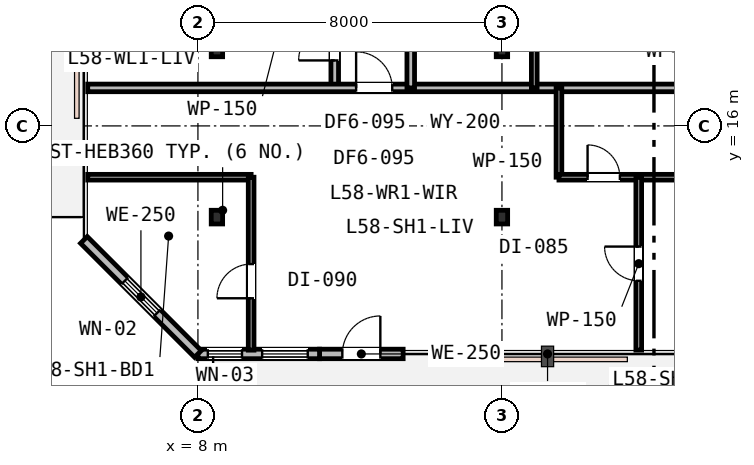
"""IFC4 building model, lengths in metres.
Left out: names, types, materials, properties, quantities, classifications, styles, units other than length and angle.
Written with IfcOpenShell. Run it as: python <this file> out.ifc"""

import sys

from ifc_helpers import new_model, si_unit, direction, frame, frame_2d, origin, origin_2d, place, context, subcontext, project, spatial, rectangle, i_section, extrude, element, fill, save


model = new_model("IFC4")
c1 = context("Model", 3, precision=1e-05, world=origin(), true_north=direction((0.0, 1.0)))
c2 = subcontext(c1, "Body", "Model", "MODEL_VIEW")
j1 = project(units=[si_unit("LENGTHUNIT", "METRE"), si_unit("PLANEANGLEUNIT", "RADIAN")], contexts=[c1])
p1 = place(None, origin())
s1 = spatial("IfcSite", under=j1, at=p1, CompositionType="ELEMENT")
p2 = place(p1, origin())
s2 = spatial("IfcBuilding", under=s1, at=p2, CompositionType="ELEMENT")
p3 = place(p2, frame((0.0, 0.0, 226.0)))
s3 = spatial("IfcBuildingStorey", under=s2, at=p3, CompositionType="ELEMENT", Elevation=226.0)
for number, where, z_axis, x_axis in (
    (1, (8.5, 13.6, 0.0), (0.0, 0.0, 1.0), (1.0, 0.0, 0.0)),
    (2, (16.0, 13.6, 0.0), (0.0, 0.0, 1.0), (1.0, 0.0, 0.0)),
    (3, (8.5, 18.0, 0.0), (0.0, 0.0, 1.0), (1.0, 0.0, 0.0)),
    (4, (16.0, 18.0, 0.0), (0.0, 0.0, 1.0), (1.0, 0.0, 0.0)),
):
    element("IfcColumn", number, at=place(p3, frame(where, z_axis=z_axis, x_axis=x_axis)), inside=s3, PredefinedType="COLUMN", context=c2, shape_type="SweptSolid", body=[
        extrude(i_section(OverallWidth=0.3, OverallDepth=0.36, WebThickness=0.013, FlangeThickness=0.022, FilletRadius=0.027, at=origin_2d()), origin(), (0.0, 0.0, 1.0), 3.8),
    ])
p4 = place(p3, frame((11.2, 10.0, 0.0), z_axis=(0.0, 0.0, 1.0), x_axis=(1.0, 0.0, 0.0)))
e5 = element("IfcWall", 5, at=p4, inside=s3, PredefinedType="STANDARD", context=c2, shape_type="SweptSolid", body=[
    extrude(rectangle(XDim=2.2, YDim=0.25, at=frame_2d((1.1, 0.0))), origin(), (0.0, 0.0, 1.0), 3.53),
])
p5 = place(p4, frame((0.6, 0.0, 0.0)))
e6 = element("IfcOpeningElement", 6, at=p5, cuts=e5, PredefinedType="OPENING", context=c2, shape_type="SweptSolid", body=[
    extrude(rectangle(XDim=1.0, YDim=2.15, at=frame_2d((0.5, 1.075))), frame((0.0, 0.135, 0.0), z_axis=(0.0, -1.0, 0.0), x_axis=(1.0, 0.0, 0.0)), (0.0, 0.0, 1.0), 0.27),
])
p6 = place(p3, frame((8.0, 10.0, 0.0), z_axis=(0.0, 0.0, 1.0), x_axis=(1.0, 0.0, 0.0)))
e7 = element("IfcWall", 7, at=p6, inside=s3, PredefinedType="STANDARD", context=c2, shape_type="SweptSolid", body=[
    extrude(rectangle(XDim=3.2, YDim=0.25, at=frame_2d((1.6, 0.0))), origin(), (0.0, 0.0, 1.0), 3.53),
])
p7 = place(p6, frame((0.26, 0.0, 0.9)))
e8 = element("IfcOpeningElement", 8, at=p7, cuts=e7, PredefinedType="OPENING", context=c2, shape_type="SweptSolid", body=[
    extrude(rectangle(XDim=0.9, YDim=1.55, at=frame_2d((0.45, 0.775))), frame((0.0, 0.135, 0.0), z_axis=(0.0, -1.0, 0.0), x_axis=(1.0, 0.0, 0.0)), (0.0, 0.0, 1.0), 0.27),
])
p8 = place(p6, frame((1.69, 0.0, 0.85)))
e9 = element("IfcOpeningElement", 9, at=p8, cuts=e7, PredefinedType="OPENING", context=c2, shape_type="SweptSolid", body=[
    extrude(rectangle(XDim=1.2, YDim=1.6, at=frame_2d((0.6, 0.8))), frame((0.0, 0.135, 0.0), z_axis=(0.0, -1.0, 0.0), x_axis=(1.0, 0.0, 0.0)), (0.0, 0.0, 1.0), 0.27),
])
p9 = place(p3, frame((5.0, 13.0, 0.0), z_axis=(0.0, 0.0, 1.0), x_axis=(0.707106781187, -0.707106781187, 0.0)))
e10 = element("IfcWall", 10, at=p9, inside=s3, PredefinedType="STANDARD", context=c2, shape_type="SweptSolid", body=[
    extrude(rectangle(XDim=4.243, YDim=0.25, at=frame_2d((2.121, 0.0))), origin(), (0.0, 0.0, 1.0), 3.53),
])
p10 = place(p9, frame((1.521, 0.0, 0.85)))
e11 = element("IfcOpeningElement", 11, at=p10, cuts=e10, PredefinedType="OPENING", context=c2, shape_type="SweptSolid", body=[
    extrude(rectangle(XDim=1.2, YDim=1.6, at=frame_2d((0.6, 0.8))), frame((0.0, 0.135, 0.0), z_axis=(0.0, -1.0, 0.0), x_axis=(1.0, 0.0, 0.0)), (0.0, 0.0, 1.0), 0.27),
])
p11 = place(p3, frame((11.6, 17.0, 0.0), z_axis=(0.0, 0.0, 1.0), x_axis=(0.0, 1.0, 0.0)))
e12 = element("IfcWall", 12, at=p11, inside=s3, PredefinedType="PARTITIONING", context=c2, shape_type="SweptSolid", body=[
    extrude(rectangle(XDim=25.9, YDim=0.2, at=frame_2d((12.95, 0.0))), origin(), (0.0, 0.0, 1.0), 2.92),
])
p12 = place(p11, frame((12.225, 0.0, 0.0)))
e13 = element("IfcOpeningElement", 13, at=p12, cuts=e12, PredefinedType="OPENING", context=c2, shape_type="SweptSolid", body=[
    extrude(rectangle(XDim=0.95, YDim=2.15, at=frame_2d((0.475, 1.075))), frame((0.0, 0.11, 0.0), z_axis=(0.0, -1.0, 0.0), x_axis=(1.0, 0.0, 0.0)), (0.0, 0.0, 1.0), 0.22),
])
p13 = place(p11, frame((0.723, 0.0, 0.0)))
e14 = element("IfcOpeningElement", 14, at=p13, cuts=e12, PredefinedType="OPENING", context=c2, shape_type="SweptSolid", body=[
    extrude(rectangle(XDim=0.95, YDim=2.15, at=frame_2d((0.475, 1.075))), frame((0.0, 0.11, 0.0), z_axis=(0.0, -1.0, 0.0), x_axis=(1.0, 0.0, 0.0)), (0.0, 0.0, 1.0), 0.22),
])
p14 = place(p3, frame((5.1, 17.0, 0.0), z_axis=(0.0, 0.0, 1.0), x_axis=(1.0, 0.0, 0.0)))
e15 = element("IfcWall", 15, at=p14, inside=s3, PredefinedType="PARTITIONING", context=c2, shape_type="SweptSolid", body=[
    extrude(rectangle(XDim=18.8, YDim=0.2, at=frame_2d((9.4, 0.0))), origin(), (0.0, 0.0, 1.0), 2.92),
])
p15 = place(p14, frame((7.063, 0.0, 0.0)))
e16 = element("IfcOpeningElement", 16, at=p15, cuts=e15, PredefinedType="OPENING", context=c2, shape_type="SweptSolid", body=[
    extrude(rectangle(XDim=0.95, YDim=2.15, at=frame_2d((0.475, 1.075))), frame((0.0, 0.11, 0.0), z_axis=(0.0, -1.0, 0.0), x_axis=(1.0, 0.0, 0.0)), (0.0, 0.0, 1.0), 0.22),
])
p16 = place(p3, frame((13.6, 17.0, 0.0), z_axis=(0.0, 0.0, 1.0), x_axis=(0.0, 1.0, 0.0)))
e17 = element("IfcWall", 17, at=p16, inside=s3, PredefinedType="PARTITIONING", context=c2, shape_type="SweptSolid", body=[
    extrude(rectangle(XDim=11.6, YDim=0.2, at=frame_2d((5.8, 0.0))), origin(), (0.0, 0.0, 1.0), 2.92),
])
p17 = place(p16, frame((10.225, 0.0, 0.0)))
e18 = element("IfcOpeningElement", 18, at=p17, cuts=e17, PredefinedType="OPENING", context=c2, shape_type="SweptSolid", body=[
    extrude(rectangle(XDim=0.95, YDim=2.15, at=frame_2d((0.475, 1.075))), frame((0.0, 0.11, 0.0), z_axis=(0.0, -1.0, 0.0), x_axis=(1.0, 0.0, 0.0)), (0.0, 0.0, 1.0), 0.22),
])
p18 = place(p3, frame((16.85, 17.0, 0.0), z_axis=(0.0, 0.0, 1.0), x_axis=(0.0, 1.0, 0.0)))
e19 = element("IfcWall", 19, at=p18, inside=s3, PredefinedType="PARTITIONING", context=c2, shape_type="SweptSolid", body=[
    extrude(rectangle(XDim=9.8, YDim=0.15, at=frame_2d((4.9, 0.0))), origin(), (0.0, 0.0, 1.0), 2.92),
])
p19 = place(p18, frame((5.598, 0.0, 0.0)))
e20 = element("IfcOpeningElement", 20, at=p19, cuts=e19, PredefinedType="OPENING", context=c2, shape_type="SweptSolid", body=[
    extrude(rectangle(XDim=0.85, YDim=2.15, at=frame_2d((0.425, 1.075))), frame((0.0, 0.085, 0.0), z_axis=(0.0, -1.0, 0.0), x_axis=(1.0, 0.0, 0.0)), (0.0, 0.0, 1.0), 0.17),
])
p20 = place(p18, frame((8.496, 0.0, 0.0)))
e21 = element("IfcOpeningElement", 21, at=p20, cuts=e19, PredefinedType="OPENING", context=c2, shape_type="SweptSolid", body=[
    extrude(rectangle(XDim=0.85, YDim=2.15, at=frame_2d((0.425, 1.075))), frame((0.0, 0.085, 0.0), z_axis=(0.0, -1.0, 0.0), x_axis=(1.0, 0.0, 0.0)), (0.0, 0.0, 1.0), 0.17),
])
p21 = place(p18, frame((2.268, 0.0, 0.0)))
e22 = element("IfcOpeningElement", 22, at=p21, cuts=e19, PredefinedType="OPENING", context=c2, shape_type="SweptSolid", body=[
    extrude(rectangle(XDim=0.85, YDim=2.15, at=frame_2d((0.425, 1.075))), frame((0.0, 0.085, 0.0), z_axis=(0.0, -1.0, 0.0), x_axis=(1.0, 0.0, 0.0)), (0.0, 0.0, 1.0), 0.17),
])
p22 = place(p3, frame((17.5, 14.65, 0.0), z_axis=(0.0, 0.0, 1.0), x_axis=(0.0, 1.0, 0.0)))
e23 = element("IfcWall", 23, at=p22, inside=s3, PredefinedType="PARTITIONING", context=c2, shape_type="SweptSolid", body=[
    extrude(rectangle(XDim=2.35, YDim=0.15, at=frame_2d((1.175, 0.0))), origin(), (0.0, 0.0, 1.0), 3.53),
])
p23 = place(p3, frame((17.5, 14.65, 0.0), z_axis=(0.0, 0.0, 1.0), x_axis=(1.0, 0.0, 0.0)))
e24 = element("IfcWall", 24, at=p23, inside=s3, PredefinedType="PARTITIONING", context=c2, shape_type="SweptSolid", body=[
    extrude(rectangle(XDim=6.4, YDim=0.15, at=frame_2d((3.2, 0.0))), origin(), (0.0, 0.0, 1.0), 3.22),
])
p24 = place(p23, frame((0.753, 0.0, 0.0)))
e25 = element("IfcOpeningElement", 25, at=p24, cuts=e24, PredefinedType="OPENING", context=c2, shape_type="SweptSolid", body=[
    extrude(rectangle(XDim=0.85, YDim=2.15, at=frame_2d((0.425, 1.075))), frame((0.0, 0.085, 0.0), z_axis=(0.0, -1.0, 0.0), x_axis=(1.0, 0.0, 0.0)), (0.0, 0.0, 1.0), 0.17),
])
p25 = place(p23, frame((3.771, 0.0, 0.0)))
e26 = element("IfcOpeningElement", 26, at=p25, cuts=e24, PredefinedType="OPENING", context=c2, shape_type="SweptSolid", body=[
    extrude(rectangle(XDim=0.85, YDim=2.15, at=frame_2d((0.425, 1.075))), frame((0.0, 0.085, 0.0), z_axis=(0.0, -1.0, 0.0), x_axis=(1.0, 0.0, 0.0)), (0.0, 0.0, 1.0), 0.17),
])
p26 = place(p3, frame((5.1, 14.65, 0.0), z_axis=(0.0, 0.0, 1.0), x_axis=(1.0, 0.0, 0.0)))
e27 = element("IfcWall", 27, at=p26, inside=s3, PredefinedType="PARTITIONING", context=c2, shape_type="SweptSolid", body=[
    extrude(rectangle(XDim=4.3, YDim=0.15, at=frame_2d((2.15, 0.0))), origin(), (0.0, 0.0, 1.0), 2.92),
])
p27 = place(p3, frame((9.4, 10.1, 0.0), z_axis=(0.0, 0.0, 1.0), x_axis=(0.0, 1.0, 0.0)))
e28 = element("IfcWall", 28, at=p27, inside=s3, PredefinedType="PARTITIONING", context=c2, shape_type="SweptSolid", body=[
    extrude(rectangle(XDim=4.55, YDim=0.15, at=frame_2d((2.275, 0.0))), origin(), (0.0, 0.0, 1.0), 2.92),
])
p28 = place(p27, frame((1.365, 0.0, 0.0)))
e29 = element("IfcOpeningElement", 29, at=p28, cuts=e28, PredefinedType="OPENING", context=c2, shape_type="SweptSolid", body=[
    extrude(rectangle(XDim=0.9, YDim=2.15, at=frame_2d((0.45, 1.075))), frame((0.0, 0.085, 0.0), z_axis=(0.0, -1.0, 0.0), x_axis=(1.0, 0.0, 0.0)), (0.0, 0.0, 1.0), 0.17),
])
p29 = place(p3, frame((19.6, 10.1, 0.0), z_axis=(0.0, 0.0, 1.0), x_axis=(0.0, 1.0, 0.0)))
e30 = element("IfcWall", 30, at=p29, inside=s3, PredefinedType="PARTITIONING", context=c2, shape_type="SweptSolid", body=[
    extrude(rectangle(XDim=4.55, YDim=0.15, at=frame_2d((2.275, 0.0))), origin(), (0.0, 0.0, 1.0), 2.92),
])
p30 = place(p29, frame((1.825, 0.0, 0.0)))
e31 = element("IfcOpeningElement", 31, at=p30, cuts=e30, PredefinedType="OPENING", context=c2, shape_type="SweptSolid", body=[
    extrude(rectangle(XDim=0.9, YDim=2.15, at=frame_2d((0.45, 1.075))), frame((0.0, 0.085, 0.0), z_axis=(0.0, -1.0, 0.0), x_axis=(1.0, 0.0, 0.0)), (0.0, 0.0, 1.0), 0.17),
])
p31 = place(p5, origin())
e32 = element("IfcDoor", 32, at=p31, inside=s3, OperationType="SINGLE_SWING_RIGHT", PredefinedType="DOOR", context=c2, shape_type="SweptSolid", body=[
    extrude(rectangle(XDim=1.0, YDim=2.15, at=frame_2d((0.5, 1.075))), frame((0.0, 0.025, 0.0), z_axis=(0.0, -1.0, 0.0), x_axis=(1.0, 0.0, 0.0)), (0.0, 0.0, 1.0), 0.05),
])
fill(e6, e32)
p32 = place(p7, origin())
e33 = element("IfcWindow", 33, at=p32, inside=s3, PartitioningType="SINGLE_PANEL", PredefinedType="WINDOW", context=c2, shape_type="SweptSolid", body=[
    extrude(rectangle(XDim=0.9, YDim=1.55, at=frame_2d((0.45, 0.775))), frame((0.0, 0.03, 0.0), z_axis=(0.0, -1.0, 0.0), x_axis=(1.0, 0.0, 0.0)), (0.0, 0.0, 1.0), 0.06),
])
fill(e8, e33)
p33 = place(p8, origin())
e34 = element("IfcWindow", 34, at=p33, inside=s3, PartitioningType="SINGLE_PANEL", PredefinedType="WINDOW", context=c2, shape_type="SweptSolid", body=[
    extrude(rectangle(XDim=1.2, YDim=1.6, at=frame_2d((0.6, 0.8))), frame((0.0, 0.03, 0.0), z_axis=(0.0, -1.0, 0.0), x_axis=(1.0, 0.0, 0.0)), (0.0, 0.0, 1.0), 0.06),
])
fill(e9, e34)
p34 = place(p10, origin())
e35 = element("IfcWindow", 35, at=p34, inside=s3, PartitioningType="SINGLE_PANEL", PredefinedType="WINDOW", context=c2, shape_type="SweptSolid", body=[
    extrude(rectangle(XDim=1.2, YDim=1.6, at=frame_2d((0.6, 0.8))), frame((0.0, 0.03, 0.0), z_axis=(0.0, -1.0, 0.0), x_axis=(1.0, 0.0, 0.0)), (0.0, 0.0, 1.0), 0.06),
])
fill(e11, e35)
p35 = place(p13, origin())
e36 = element("IfcDoor", 36, at=p35, inside=s3, OperationType="SINGLE_SWING_LEFT", PredefinedType="DOOR", context=c2, shape_type="SweptSolid", body=[
    extrude(rectangle(XDim=0.95, YDim=2.15, at=frame_2d((0.475, 1.075))), frame((0.0, 0.025, 0.0), z_axis=(0.0, -1.0, 0.0), x_axis=(1.0, 0.0, 0.0)), (0.0, 0.0, 1.0), 0.05),
])
fill(e14, e36)
p36 = place(p15, origin())
e37 = element("IfcDoor", 37, at=p36, inside=s3, OperationType="SINGLE_SWING_LEFT", PredefinedType="DOOR", context=c2, shape_type="SweptSolid", body=[
    extrude(rectangle(XDim=0.95, YDim=2.15, at=frame_2d((0.475, 1.075))), frame((0.0, 0.025, 0.0), z_axis=(0.0, -1.0, 0.0), x_axis=(1.0, 0.0, 0.0)), (0.0, 0.0, 1.0), 0.05),
])
fill(e16, e37)
p37 = place(p24, origin())
e38 = element("IfcDoor", 38, at=p37, inside=s3, OperationType="SINGLE_SWING_LEFT", PredefinedType="DOOR", context=c2, shape_type="SweptSolid", body=[
    extrude(rectangle(XDim=0.85, YDim=2.15, at=frame_2d((0.425, 1.075))), frame((0.0, 0.025, 0.0), z_axis=(0.0, -1.0, 0.0), x_axis=(1.0, 0.0, 0.0)), (0.0, 0.0, 1.0), 0.05),
])
fill(e25, e38)
p38 = place(p28, origin())
e39 = element("IfcDoor", 39, at=p38, inside=s3, OperationType="SINGLE_SWING_LEFT", PredefinedType="DOOR", context=c2, shape_type="SweptSolid", body=[
    extrude(rectangle(XDim=0.9, YDim=2.15, at=frame_2d((0.45, 1.075))), frame((0.0, 0.025, 0.0), z_axis=(0.0, -1.0, 0.0), x_axis=(1.0, 0.0, 0.0)), (0.0, 0.0, 1.0), 0.05),
])
fill(e29, e39)
p39 = place(p30, origin())
e40 = element("IfcDoor", 40, at=p39, inside=s3, OperationType="SINGLE_SWING_RIGHT", PredefinedType="DOOR", context=c2, shape_type="SweptSolid", body=[
    extrude(rectangle(XDim=0.9, YDim=2.15, at=frame_2d((0.45, 1.075))), frame((0.0, 0.025, 0.0), z_axis=(0.0, -1.0, 0.0), x_axis=(1.0, 0.0, 0.0)), (0.0, 0.0, 1.0), 0.05),
])
fill(e31, e40)
save(model, sys.argv[1])
